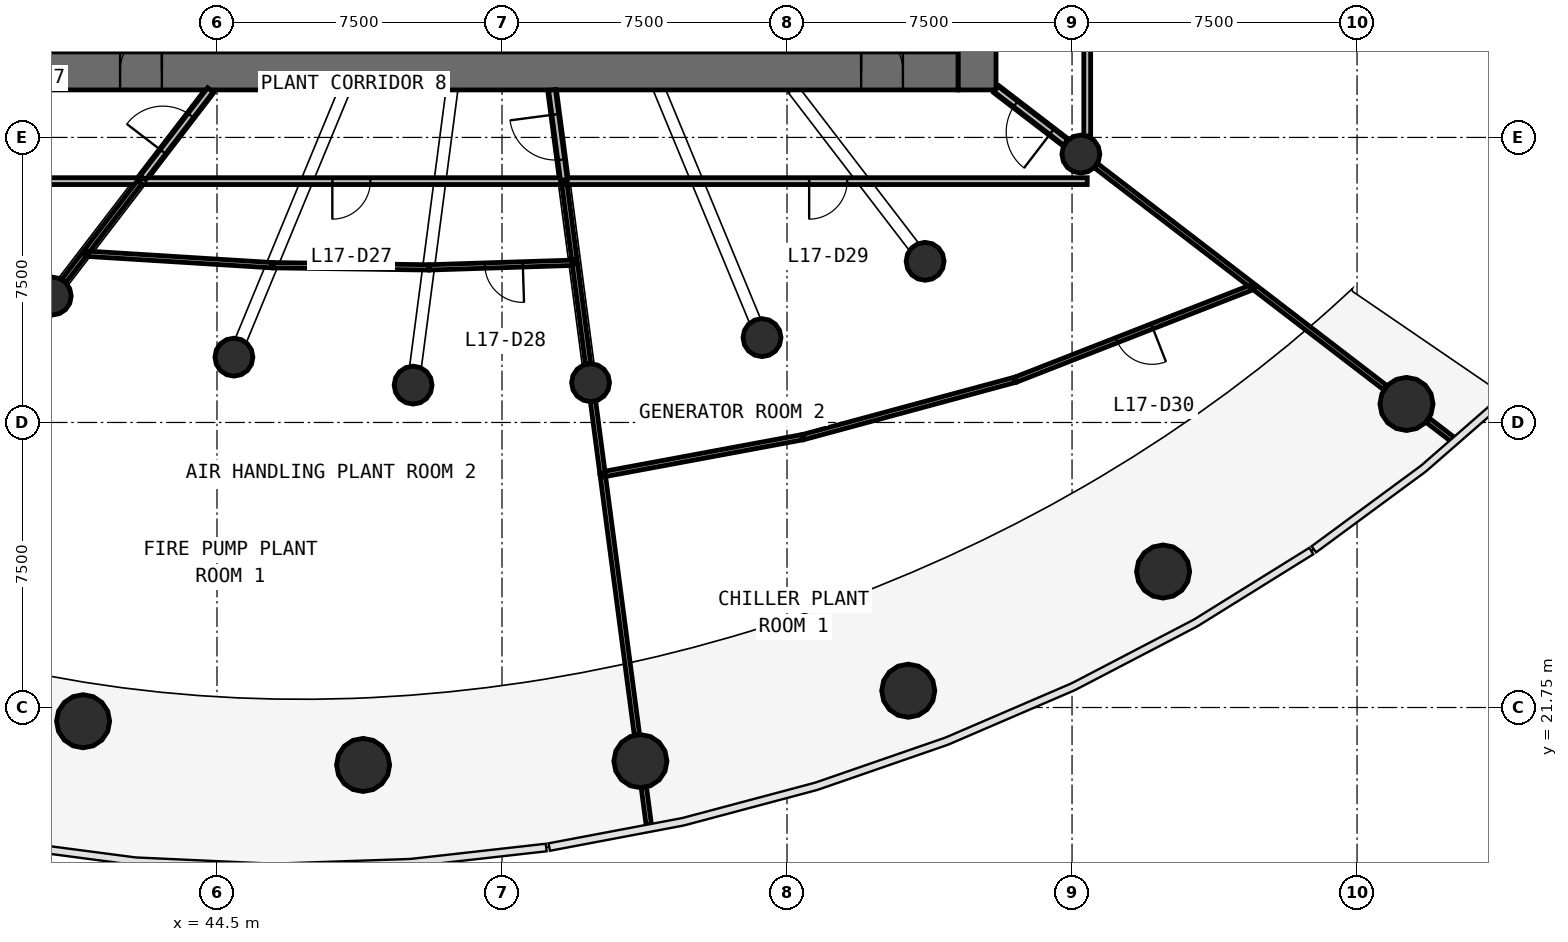
"""IFC4 building model, lengths in metres.
Left out: names, types, materials, properties, quantities, classifications, styles, units other than length and angle.
Written with IfcOpenShell. Run it as: python <this file> out.ifc"""

import sys

from ifc_helpers import new_model, si_unit, direction, frame, frame_2d, origin, origin_2d, place, context, subcontext, project, spatial, rectangle, circle, extrude, source, transform, mapped, element, fill, save


model = new_model("IFC4")
c1 = context("Model", 3, precision=1e-05, world=origin(), true_north=direction((0.0, 1.0)))
c2 = subcontext(c1, "Body", "Model", "MODEL_VIEW")
j1 = project(units=[si_unit("LENGTHUNIT", "METRE"), si_unit("PLANEANGLEUNIT", "RADIAN")], contexts=[c1])
p1 = place(None, origin())
s1 = spatial("IfcSite", under=j1, at=p1, CompositionType="ELEMENT")
p2 = place(p1, origin())
s2 = spatial("IfcBuilding", under=s1, at=p2, CompositionType="ELEMENT")
p3 = place(p2, frame((0.0, 0.0, 75.4)))
s3 = spatial("IfcBuildingStorey", under=s2, at=p3, CompositionType="ELEMENT", Elevation=75.4)
p4 = place(p3, frame((64.5, 38.0, 0.0), z_axis=(0.0, 0.0, 1.0), x_axis=(0.0, 1.0, 0.0)))
e1 = element("IfcWall", 1, at=p4, inside=s3, PredefinedType="SHEAR", context=c2, shape_type="SweptSolid", body=[
    extrude(rectangle(XDim=20.0, YDim=1.0, at=frame_2d((10.0, 0.0))), origin(), (0.0, 0.0, 1.0), 4.4),
])
p5 = place(p4, frame((9.1, 0.0, 0.0)))
e2 = element("IfcOpeningElement", 2, at=p5, cuts=e1, PredefinedType="OPENING", context=c2, shape_type="SweptSolid", body=[
    extrude(rectangle(XDim=1.8, YDim=2.1, at=frame_2d((0.9, 1.05))), frame((0.0, 0.51, 0.0), z_axis=(0.0, -1.0, 0.0), x_axis=(1.0, 0.0, 0.0)), (0.0, 0.0, 1.0), 1.02),
])
p6 = place(p3, frame((40.0, 38.5, 0.0), z_axis=(0.0, 0.0, 1.0), x_axis=(1.0, 0.0, 0.0)))
e3 = element("IfcWall", 3, at=p6, inside=s3, PredefinedType="SHEAR", context=c2, shape_type="SweptSolid", body=[
    extrude(rectangle(XDim=24.0, YDim=1.0, at=frame_2d((12.0, 0.0))), origin(), (0.0, 0.0, 1.0), 4.4),
])
p7 = place(p6, frame((21.45, 0.0, 0.0)))
e4 = element("IfcOpeningElement", 4, at=p7, cuts=e3, PredefinedType="OPENING", context=c2, shape_type="SweptSolid", body=[
    extrude(rectangle(XDim=1.1, YDim=2.1, at=frame_2d((0.55, 1.05))), frame((0.0, 0.51, 0.0), z_axis=(0.0, -1.0, 0.0), x_axis=(1.0, 0.0, 0.0)), (0.0, 0.0, 1.0), 1.02),
])
p8 = place(p6, frame((1.95, 0.0, 0.0)))
e5 = element("IfcOpeningElement", 5, at=p8, cuts=e3, PredefinedType="OPENING", context=c2, shape_type="SweptSolid", body=[
    extrude(rectangle(XDim=1.1, YDim=2.1, at=frame_2d((0.55, 1.05))), frame((0.0, 0.51, 0.0), z_axis=(0.0, -1.0, 0.0), x_axis=(1.0, 0.0, 0.0)), (0.0, 0.0, 1.0), 1.02),
])
m1 = source(origin(), c2, "Body", "SweptSolid", [
    extrude(circle(Radius=0.7, at=origin_2d()), origin(), (0.0, 0.0, 1.0), 4.0),
])
for number, where, z_axis, x_axis in (
    (6, (40.977, 21.389, 0.0), (0.0, 0.0, 1.0), (1.0, 0.0, 0.0)),
    (7, (48.345, 20.239, 0.0), (0.0, 0.0, 1.0), (1.0, 0.0, 0.0)),
    (8, (55.642, 20.339, 0.0), (0.0, 0.0, 1.0), (1.0, 0.0, 0.0)),
    (9, (62.69, 22.191, 0.0), (0.0, 0.0, 1.0), (1.0, 0.0, 0.0)),
    (10, (69.396, 25.328, 0.0), (0.0, 0.0, 1.0), (1.0, 0.0, 0.0)),
    (11, (75.801, 29.737, 0.0), (0.0, 0.0, 1.0), (1.0, 0.0, 0.0)),
):
    element("IfcColumn", number, at=place(p3, frame(where, z_axis=z_axis, x_axis=x_axis)), inside=s3, PredefinedType="COLUMN", context=c2, shape_type="MappedRepresentation", body=[
        mapped(m1, transform((0.0, 0.0, 0.0), scale=1.0)),
    ])
m2 = source(origin(), c2, "Body", "SweptSolid", [
    extrude(circle(Radius=0.5, at=origin_2d()), origin(), (0.0, 0.0, 1.0), 4.4),
])
for number, where, z_axis, x_axis in (
    (12, (40.165, 32.576, 0.0), (0.0, 0.0, 1.0), (1.0, 0.0, 0.0)),
    (13, (44.945, 30.969, 0.0), (0.0, 0.0, 1.0), (1.0, 0.0, 0.0)),
    (14, (49.661, 30.233, 0.0), (0.0, 0.0, 1.0), (1.0, 0.0, 0.0)),
    (15, (54.331, 30.297, 0.0), (0.0, 0.0, 1.0), (1.0, 0.0, 0.0)),
    (16, (58.842, 31.482, 0.0), (0.0, 0.0, 1.0), (1.0, 0.0, 0.0)),
    (17, (63.134, 33.49, 0.0), (0.0, 0.0, 1.0), (1.0, 0.0, 0.0)),
    (18, (67.232, 36.312, 0.0), (0.0, 0.0, 1.0), (1.0, 0.0, 0.0)),
):
    element("IfcColumn", number, at=place(p3, frame(where, z_axis=z_axis, x_axis=x_axis)), inside=s3, PredefinedType="COLUMN", context=c2, shape_type="MappedRepresentation", body=[
        mapped(m2, transform((0.0, 0.0, 0.0), scale=1.0)),
    ])
p9 = place(p3, frame((67.4, 35.6, 0.0), z_axis=(0.0, 0.0, 1.0), x_axis=(-1.0, 0.0, 0.0)))
e19 = element("IfcWall", 19, at=p9, inside=s3, PredefinedType="PARTITIONING", context=c2, shape_type="SweptSolid", body=[
    extrude(rectangle(XDim=13.767, YDim=0.18, at=frame_2d((6.884, 0.0))), origin(), (0.0, 0.0, 1.0), 2.8),
])
p10 = place(p9, frame((6.317, 0.0, 0.0)))
e20 = element("IfcOpeningElement", 20, at=p10, cuts=e19, PredefinedType="OPENING", context=c2, shape_type="SweptSolid", body=[
    extrude(rectangle(XDim=1.0, YDim=2.1, at=frame_2d((0.5, 1.05))), frame((0.0, 0.1, 0.0), z_axis=(0.0, -1.0, 0.0), x_axis=(1.0, 0.0, 0.0)), (0.0, 0.0, 1.0), 0.2),
])
p11 = place(p3, frame((67.4, 50.027, 0.0), z_axis=(0.0, 0.0, 1.0), x_axis=(0.0, -1.0, 0.0)))
e21 = element("IfcWall", 21, at=p11, inside=s3, PredefinedType="PARTITIONING", context=c2, shape_type="SweptSolid", body=[
    extrude(rectangle(XDim=13.24, YDim=0.18, at=frame_2d((6.62, 0.0))), origin(), (0.0, 0.0, 1.0), 2.8),
])
p12 = place(p11, frame((6.19, 0.0, 0.0)))
e22 = element("IfcOpeningElement", 22, at=p12, cuts=e21, PredefinedType="OPENING", context=c2, shape_type="SweptSolid", body=[
    extrude(rectangle(XDim=1.0, YDim=2.1, at=frame_2d((0.5, 1.05))), frame((0.0, 0.1, 0.0), z_axis=(0.0, -1.0, 0.0), x_axis=(1.0, 0.0, 0.0)), (0.0, 0.0, 1.0), 0.2),
])
p13 = place(p3, frame((53.603, 35.6, 0.0), z_axis=(0.0, 0.0, 1.0), x_axis=(-1.0, 0.0, 0.0)))
e23 = element("IfcWall", 23, at=p13, inside=s3, PredefinedType="PARTITIONING", context=c2, shape_type="SweptSolid", body=[
    extrude(rectangle(XDim=11.117, YDim=0.18, at=frame_2d((5.559, 0.0))), origin(), (0.0, 0.0, 1.0), 2.8),
])
p14 = place(p13, frame((5.067, 0.0, 0.0)))
e24 = element("IfcOpeningElement", 24, at=p14, cuts=e23, PredefinedType="OPENING", context=c2, shape_type="SweptSolid", body=[
    extrude(rectangle(XDim=1.0, YDim=2.1, at=frame_2d((0.5, 1.05))), frame((0.0, 0.1, 0.0), z_axis=(0.0, -1.0, 0.0), x_axis=(1.0, 0.0, 0.0)), (0.0, 0.0, 1.0), 0.2),
])
p15 = place(p3, frame((36.63, 35.6, 0.0), z_axis=(0.0, 0.0, 1.0), x_axis=(1.0, 0.0, 0.0)))
e25 = element("IfcWall", 25, at=p15, inside=s3, PredefinedType="PARTITIONING", context=c2, shape_type="SweptSolid", body=[
    extrude(rectangle(XDim=5.825, YDim=0.18, at=frame_2d((2.913, 0.0))), origin(), (0.0, 0.0, 1.0), 2.8),
])
p16 = place(p3, frame((42.554, 35.69, 0.0), z_axis=(0.0, 0.0, 1.0), x_axis=(0.608737787706, 0.793371480341, 0.0)))
e26 = element("IfcWall", 26, at=p16, inside=s3, PredefinedType="PARTITIONING", context=c2, shape_type="SweptSolid", body=[
    extrude(rectangle(XDim=2.912, YDim=0.18, at=frame_2d((1.456, 0.0))), origin(), (0.0, 0.0, 1.0), 2.8),
])
p17 = place(p16, frame((0.862, 0.0, 0.0)))
e27 = element("IfcOpeningElement", 27, at=p17, cuts=e26, PredefinedType="OPENING", context=c2, shape_type="SweptSolid", body=[
    extrude(rectangle(XDim=1.2, YDim=2.1, at=frame_2d((0.6, 1.05))), frame((0.0, 0.1, 0.0), z_axis=(0.0, -1.0, 0.0), x_axis=(1.0, 0.0, 0.0)), (0.0, 0.0, 1.0), 0.2),
])
p18 = place(p3, frame((53.629, 35.63, 0.0), z_axis=(0.0, 0.0, 1.0), x_axis=(-0.13060507681, 0.991434472828, 0.0)))
e28 = element("IfcWall", 28, at=p18, inside=s3, PredefinedType="PARTITIONING", context=c2, shape_type="SweptSolid", body=[
    extrude(rectangle(XDim=2.391, YDim=0.18, at=frame_2d((1.195, 0.0))), origin(), (0.0, 0.0, 1.0), 2.8),
])
p19 = place(p18, frame((0.541, 0.0, 0.0)))
e29 = element("IfcOpeningElement", 29, at=p19, cuts=e28, PredefinedType="OPENING", context=c2, shape_type="SweptSolid", body=[
    extrude(rectangle(XDim=1.2, YDim=2.1, at=frame_2d((0.6, 1.05))), frame((0.0, 0.1, 0.0), z_axis=(0.0, -1.0, 0.0), x_axis=(1.0, 0.0, 0.0)), (0.0, 0.0, 1.0), 0.2),
])
p20 = place(p3, frame((66.832, 36.619, 0.0), z_axis=(0.0, 0.0, 1.0), x_axis=(-0.793393624489, 0.608708926023, 0.0)))
e30 = element("IfcWall", 30, at=p20, inside=s3, PredefinedType="PARTITIONING", context=c2, shape_type="SweptSolid", body=[
    extrude(rectangle(XDim=2.309, YDim=0.18, at=frame_2d((1.155, 0.0))), origin(), (0.0, 0.0, 1.0), 2.8),
])
p21 = place(p20, frame((0.459, 0.0, 0.0)))
e31 = element("IfcOpeningElement", 31, at=p21, cuts=e30, PredefinedType="OPENING", context=c2, shape_type="SweptSolid", body=[
    extrude(rectangle(XDim=1.2, YDim=2.1, at=frame_2d((0.6, 1.05))), frame((0.0, 0.1, 0.0), z_axis=(0.0, -1.0, 0.0), x_axis=(1.0, 0.0, 0.0)), (0.0, 0.0, 1.0), 0.2),
])
p22 = place(p3, frame((54.648, 27.885, 0.0), z_axis=(0.0, 0.0, 1.0), x_axis=(0.130535889274, -0.991443584684, 0.0)))
e32 = element("IfcWall", 32, at=p22, inside=s3, PredefinedType="PARTITIONING", context=c2, shape_type="SweptSolid", body=[
    extrude(rectangle(XDim=6.907, YDim=0.14, at=frame_2d((3.454, 0.0))), origin(), (0.0, 0.0, 1.0), 2.8),
])
p23 = place(p3, frame((71.778, 32.824, 0.0), z_axis=(0.0, 0.0, 1.0), x_axis=(-0.931368207831, -0.36407864733, 0.0)))
e33 = element("IfcWall", 33, at=p23, inside=s3, PredefinedType="PARTITIONING", context=c2, shape_type="SweptSolid", body=[
    extrude(rectangle(XDim=6.717, YDim=0.14, at=frame_2d((3.358, 0.0))), origin(), (0.0, 0.0, 1.0), 2.8),
])
p24 = place(p23, frame((2.867, 0.0, 0.0)))
e34 = element("IfcOpeningElement", 34, at=p24, cuts=e33, PredefinedType="OPENING", context=c2, shape_type="SweptSolid", body=[
    extrude(rectangle(XDim=1.0, YDim=2.1, at=frame_2d((0.5, 1.05))), frame((0.0, 0.08, 0.0), z_axis=(0.0, -1.0, 0.0), x_axis=(1.0, 0.0, 0.0)), (0.0, 0.0, 1.0), 0.16),
])
p25 = place(p3, frame((59.926, 28.865, 0.0), z_axis=(0.0, 0.0, 1.0), x_axis=(0.965338892276, 0.260999661033, 0.0)))
e35 = element("IfcWall", 35, at=p25, inside=s3, PredefinedType="PARTITIONING", context=c2, shape_type="SweptSolid", body=[
    extrude(rectangle(XDim=5.767, YDim=0.14, at=frame_2d((2.883, 0.0))), origin(), (0.0, 0.0, 1.0), 2.8),
])
p26 = place(p3, frame((54.678, 27.89, 0.0), z_axis=(0.0, 0.0, 1.0), x_axis=(0.983161003838, 0.182741458164, 0.0)))
e36 = element("IfcWall", 36, at=p26, inside=s3, PredefinedType="PARTITIONING", context=c2, shape_type="SweptSolid", body=[
    extrude(rectangle(XDim=5.308, YDim=0.14, at=frame_2d((2.654, 0.0))), origin(), (0.0, 0.0, 1.0), 2.8),
])
p27 = place(p3, frame((67.633, 36.005, 0.0), z_axis=(0.0, 0.0, 1.0), x_axis=(0.793361042254, -0.608751391484, 0.0)))
e37 = element("IfcWall", 37, at=p27, inside=s3, PredefinedType="PARTITIONING", context=c2, shape_type="SweptSolid", body=[
    extrude(rectangle(XDim=5.143, YDim=0.14, at=frame_2d((2.572, 0.0))), origin(), (0.0, 0.0, 1.0), 2.8),
])
p28 = place(p3, frame((41.022, 33.694, 0.0), z_axis=(0.0, 0.0, 1.0), x_axis=(0.998082686061, -0.061894683005, 0.0)))
e38 = element("IfcWall", 38, at=p28, inside=s3, PredefinedType="PARTITIONING", context=c2, shape_type="SweptSolid", body=[
    extrude(rectangle(XDim=4.935, YDim=0.14, at=frame_2d((2.467, 0.0))), origin(), (0.0, 0.0, 1.0), 2.8),
])
p29 = place(p3, frame((71.802, 32.806, 0.0), z_axis=(0.0, 0.0, 1.0), x_axis=(0.793358014638, -0.608755337233, 0.0)))
e39 = element("IfcWall", 39, at=p29, inside=s3, PredefinedType="PARTITIONING", context=c2, shape_type="SweptSolid", body=[
    extrude(rectangle(XDim=4.336, YDim=0.14, at=frame_2d((2.168, 0.0))), origin(), (0.0, 0.0, 1.0), 2.8),
])
p30 = place(p3, frame((45.978, 33.388, 0.0), z_axis=(0.0, 0.0, 1.0), x_axis=(0.99990083992, -0.01408226999, 0.0)))
e40 = element("IfcWall", 40, at=p30, inside=s3, PredefinedType="PARTITIONING", context=c2, shape_type="SweptSolid", body=[
    extrude(rectangle(XDim=4.092, YDim=0.14, at=frame_2d((2.046, 0.0))), origin(), (0.0, 0.0, 1.0), 2.8),
])
p31 = place(p3, frame((53.915, 33.454, 0.0), z_axis=(0.0, 0.0, 1.0), x_axis=(-0.999486805555, -0.032033194062, 0.0)))
e41 = element("IfcWall", 41, at=p31, inside=s3, PredefinedType="PARTITIONING", context=c2, shape_type="SweptSolid", body=[
    extrude(rectangle(XDim=3.818, YDim=0.14, at=frame_2d((1.909, 0.0))), origin(), (0.0, 0.0, 1.0), 2.8),
])
p32 = place(p31, frame((1.368, 0.0, 0.0)))
e42 = element("IfcOpeningElement", 42, at=p32, cuts=e41, PredefinedType="OPENING", context=c2, shape_type="SweptSolid", body=[
    extrude(rectangle(XDim=1.0, YDim=2.1, at=frame_2d((0.5, 1.05))), frame((0.0, 0.08, 0.0), z_axis=(0.0, -1.0, 0.0), x_axis=(1.0, 0.0, 0.0)), (0.0, 0.0, 1.0), 0.16),
])
p33 = place(p3, frame((53.919, 33.424, 0.0), z_axis=(0.0, 0.0, 1.0), x_axis=(0.130564152963, -0.991439863008, 0.0)))
e43 = element("IfcWall", 43, at=p33, inside=s3, PredefinedType="PARTITIONING", context=c2, shape_type="SweptSolid", body=[
    extrude(rectangle(XDim=2.65, YDim=0.14, at=frame_2d((1.325, 0.0))), origin(), (0.0, 0.0, 1.0), 2.8),
])
p34 = place(p3, frame((42.463, 35.571, 0.0), z_axis=(0.0, 0.0, 1.0), x_axis=(-0.608779636854, -0.793339368589, 0.0)))
e44 = element("IfcWall", 44, at=p34, inside=s3, PredefinedType="PARTITIONING", context=c2, shape_type="SweptSolid", body=[
    extrude(rectangle(XDim=2.282, YDim=0.14, at=frame_2d((1.141, 0.0))), origin(), (0.0, 0.0, 1.0), 2.8),
])
p35 = place(p3, frame((53.644, 35.51, 0.0), z_axis=(0.0, 0.0, 1.0), x_axis=(0.130615253494, -0.991433132165, 0.0)))
e45 = element("IfcWall", 45, at=p35, inside=s3, PredefinedType="PARTITIONING", context=c2, shape_type="SweptSolid", body=[
    extrude(rectangle(XDim=2.004, YDim=0.14, at=frame_2d((1.002, 0.0))), origin(), (0.0, 0.0, 1.0), 2.8),
])
p36 = place(p3, frame((54.396, 29.797, 0.0), z_axis=(0.0, 0.0, 1.0), x_axis=(0.130521040556, -0.99144553959, 0.0)))
e46 = element("IfcWall", 46, at=p36, inside=s3, PredefinedType="PARTITIONING", context=c2, shape_type="SweptSolid", body=[
    extrude(rectangle(XDim=1.899, YDim=0.14, at=frame_2d((0.949, 0.0))), origin(), (0.0, 0.0, 1.0), 2.8),
])
p37 = place(p3, frame((55.734, 19.64, 0.0), z_axis=(0.0, 0.0, 1.0), x_axis=(0.13062697631, -0.991431587685, 0.0)))
e47 = element("IfcWall", 47, at=p37, inside=s3, PredefinedType="PARTITIONING", context=c2, shape_type="SweptSolid", body=[
    extrude(rectangle(XDim=0.989, YDim=0.14, at=frame_2d((0.494, 0.0))), origin(), (0.0, 0.0, 1.0), 3.1),
])
p38 = place(p3, frame((41.004, 33.67, 0.0), z_axis=(0.0, 0.0, 1.0), x_axis=(-0.60876565208, -0.793350099797, 0.0)))
e48 = element("IfcWall", 48, at=p38, inside=s3, PredefinedType="PARTITIONING", context=c2, shape_type="SweptSolid", body=[
    extrude(rectangle(XDim=0.874, YDim=0.14, at=frame_2d((0.437, 0.0))), origin(), (0.0, 0.0, 1.0), 2.8),
])
p39 = place(p3, frame((76.359, 29.309, 0.0), z_axis=(0.0, 0.0, 1.0), x_axis=(0.793252635304, -0.608892647832, 0.0)))
e49 = element("IfcWall", 49, at=p39, inside=s3, PredefinedType="PARTITIONING", context=c2, shape_type="SweptSolid", body=[
    extrude(rectangle(XDim=0.822, YDim=0.14, at=frame_2d((0.411, 0.0))), origin(), (0.0, 0.0, 1.0), 3.1),
])
m3 = source(origin(), c2, "Body", "SweptSolid", [
    extrude(rectangle(XDim=1.1, YDim=2.1, at=frame_2d((0.55, 1.05))), frame((0.0, 0.025, 0.0), z_axis=(0.0, -1.0, 0.0), x_axis=(1.0, 0.0, 0.0)), (0.0, 0.0, 1.0), 0.05),
])
p40 = place(p7, origin())
e50 = element("IfcDoor", 50, at=p40, inside=s3, OperationType="SINGLE_SWING_LEFT", PredefinedType="DOOR", context=c2, shape_type="MappedRepresentation", body=[
    mapped(m3, transform((0.0, 0.0, 0.0), scale=1.0)),
])
fill(e4, e50)
p41 = place(p8, origin())
e51 = element("IfcDoor", 51, at=p41, inside=s3, OperationType="SINGLE_SWING_RIGHT", PredefinedType="DOOR", context=c2, shape_type="MappedRepresentation", body=[
    mapped(m3, transform((0.0, 0.0, 0.0), scale=1.0)),
])
fill(e5, e51)
m4 = source(origin(), c2, "Body", "SweptSolid", [
    extrude(rectangle(XDim=1.0, YDim=2.1, at=frame_2d((0.5, 1.05))), frame((0.0, 0.025, 0.0), z_axis=(0.0, -1.0, 0.0), x_axis=(1.0, 0.0, 0.0)), (0.0, 0.0, 1.0), 0.05),
])
p42 = place(p14, origin())
e52 = element("IfcDoor", 52, at=p42, inside=s3, OperationType="SINGLE_SWING_RIGHT", PredefinedType="DOOR", context=c2, shape_type="MappedRepresentation", body=[
    mapped(m4, transform((0.0, 0.0, 0.0), scale=1.0)),
])
fill(e24, e52)
p43 = place(p32, origin())
e53 = element("IfcDoor", 53, at=p43, inside=s3, OperationType="SINGLE_SWING_LEFT", PredefinedType="DOOR", context=c2, shape_type="MappedRepresentation", body=[
    mapped(m4, transform((0.0, 0.0, 0.0), scale=1.0)),
])
fill(e42, e53)
p44 = place(p10, origin())
e54 = element("IfcDoor", 54, at=p44, inside=s3, OperationType="SINGLE_SWING_RIGHT", PredefinedType="DOOR", context=c2, shape_type="MappedRepresentation", body=[
    mapped(m4, transform((0.0, 0.0, 0.0), scale=1.0)),
])
fill(e20, e54)
p45 = place(p24, origin())
e55 = element("IfcDoor", 55, at=p45, inside=s3, OperationType="SINGLE_SWING_LEFT", PredefinedType="DOOR", context=c2, shape_type="MappedRepresentation", body=[
    mapped(m4, transform((0.0, 0.0, 0.0), scale=1.0)),
])
fill(e34, e55)
m5 = source(origin(), c2, "Body", "SweptSolid", [
    extrude(rectangle(XDim=1.2, YDim=2.1, at=frame_2d((0.6, 1.05))), frame((0.0, 0.025, 0.0), z_axis=(0.0, -1.0, 0.0), x_axis=(1.0, 0.0, 0.0)), (0.0, 0.0, 1.0), 0.05),
])
p46 = place(p17, origin())
e56 = element("IfcDoor", 56, at=p46, inside=s3, OperationType="SINGLE_SWING_LEFT", PredefinedType="DOOR", context=c2, shape_type="MappedRepresentation", body=[
    mapped(m5, transform((0.0, 0.0, 0.0), scale=1.0)),
])
fill(e27, e56)
p47 = place(p19, origin())
e57 = element("IfcDoor", 57, at=p47, inside=s3, OperationType="SINGLE_SWING_RIGHT", PredefinedType="DOOR", context=c2, shape_type="MappedRepresentation", body=[
    mapped(m5, transform((0.0, 0.0, 0.0), scale=1.0)),
])
fill(e29, e57)
p48 = place(p21, origin())
e58 = element("IfcDoor", 58, at=p48, inside=s3, OperationType="SINGLE_SWING_LEFT", PredefinedType="DOOR", context=c2, shape_type="MappedRepresentation", body=[
    mapped(m5, transform((0.0, 0.0, 0.0), scale=1.0)),
])
fill(e31, e58)
save(model, sys.argv[1])
